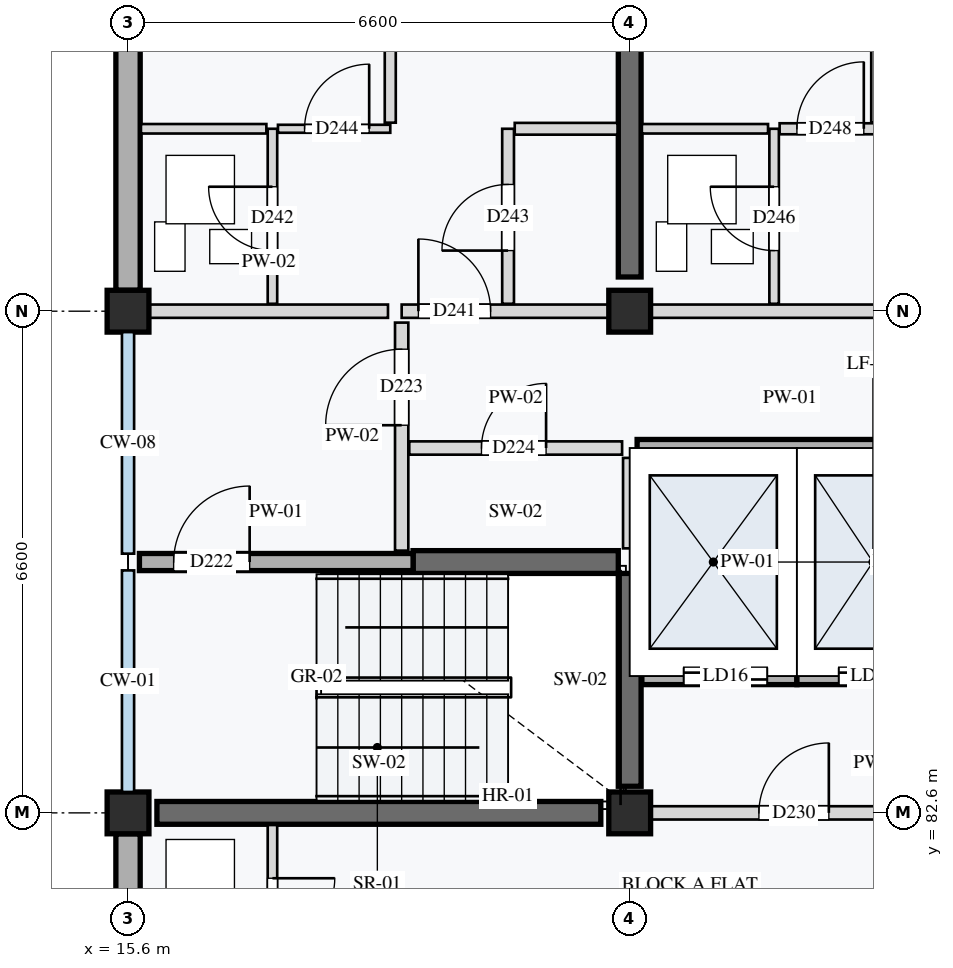
"""IFC4 building model, lengths in metres.
Left out: names, types, materials, properties, quantities, classifications, styles, units other than length and angle.
Written with IfcOpenShell. Run it as: python <this file> out.ifc"""

import sys

from ifc_helpers import new_model, si_unit, direction, frame, frame_2d, origin, origin_2d, place, context, subcontext, project, spatial, rectangle, extrude, element, fill, save


model = new_model("IFC4")
c1 = context("Model", 3, precision=1e-05, world=origin(), true_north=direction((0.0, 1.0)))
c2 = subcontext(c1, "Body", "Model", "MODEL_VIEW")
j1 = project(units=[si_unit("LENGTHUNIT", "METRE"), si_unit("PLANEANGLEUNIT", "RADIAN")], contexts=[c1])
p1 = place(None, origin())
s1 = spatial("IfcSite", under=j1, at=p1, CompositionType="ELEMENT")
p2 = place(p1, origin())
s2 = spatial("IfcBuilding", under=s1, at=p2, CompositionType="ELEMENT")
p3 = place(p2, frame((0.0, 0.0, 24.4)))
s3 = spatial("IfcBuildingStorey", under=s2, at=p3, CompositionType="ELEMENT", Elevation=24.4)
for number, where, z_axis, x_axis in (
    (1, (15.6, 82.6, 0.0), (0.0, 0.0, 1.0), (1.0, 0.0, 0.0)),
    (2, (15.6, 89.2, 0.0), (0.0, 0.0, 1.0), (1.0, 0.0, 0.0)),
    (3, (22.2, 82.6, 0.0), (0.0, 0.0, 1.0), (1.0, 0.0, 0.0)),
    (4, (22.2, 89.2, 0.0), (0.0, 0.0, 1.0), (1.0, 0.0, 0.0)),
):
    element("IfcColumn", number, at=place(p3, frame(where, z_axis=z_axis, x_axis=x_axis)), inside=s3, PredefinedType="COLUMN", context=c2, shape_type="SweptSolid", body=[
        extrude(rectangle(XDim=0.55, YDim=0.55, at=origin_2d()), origin(), (0.0, 0.0, 1.0), 3.2),
    ])
p4 = place(p3, frame((15.98, 82.6, 0.0), z_axis=(0.0, 0.0, 1.0), x_axis=(1.0, 0.0, 0.0)))
e5 = element("IfcWall", 5, at=p4, inside=s3, PredefinedType="SHEAR", context=c2, shape_type="SweptSolid", body=[
    extrude(rectangle(XDim=5.84, YDim=0.3, at=frame_2d((2.92, 0.0))), origin(), (0.0, 0.0, 1.0), 2.97),
])
p5 = place(p3, frame((19.35, 85.9, 0.0), z_axis=(0.0, 0.0, 1.0), x_axis=(1.0, 0.0, 0.0)))
e6 = element("IfcWall", 6, at=p5, inside=s3, PredefinedType="SHEAR", context=c2, shape_type="SweptSolid", body=[
    extrude(rectangle(XDim=2.7, YDim=0.3, at=frame_2d((1.35, 0.0))), origin(), (0.0, 0.0, 1.0), 2.97),
])
p6 = place(p3, frame((22.2, 82.95, 0.0), z_axis=(0.0, 0.0, 1.0), x_axis=(0.0, 1.0, 0.0)))
e7 = element("IfcWall", 7, at=p6, inside=s3, PredefinedType="SHEAR", context=c2, shape_type="SweptSolid", body=[
    extrude(rectangle(XDim=2.8, YDim=0.3, at=frame_2d((1.4, 0.0))), origin(), (0.0, 0.0, 1.0), 2.97),
])
p7 = place(p3, frame((22.2, 89.65, 0.0), z_axis=(0.0, 0.0, 1.0), x_axis=(0.0, 1.0, 0.0)))
e8 = element("IfcWall", 8, at=p7, inside=s3, PredefinedType="SHEAR", context=c2, shape_type="SweptSolid", body=[
    extrude(rectangle(XDim=5.7, YDim=0.3, at=frame_2d((2.85, 0.0))), origin(), (0.0, 0.0, 1.0), 2.97),
])
p8 = place(p3, frame((15.6, 76.275, 0.0), z_axis=(0.0, 0.0, 1.0), x_axis=(0.0, 1.0, 0.0)))
e9 = element("IfcWall", 9, at=p8, inside=s3, PredefinedType="STANDARD", context=c2, shape_type="SweptSolid", body=[
    extrude(rectangle(XDim=6.05, YDim=0.32, at=frame_2d((3.025, 0.0))), origin(), (0.0, 0.0, 1.0), 2.65),
])
p9 = place(p3, frame((15.6, 89.475, 0.0), z_axis=(0.0, 0.0, 1.0), x_axis=(0.0, 1.0, 0.0)))
e10 = element("IfcWall", 10, at=p9, inside=s3, PredefinedType="STANDARD", context=c2, shape_type="SweptSolid", body=[
    extrude(rectangle(XDim=6.05, YDim=0.32, at=frame_2d((3.025, 0.0))), origin(), (0.0, 0.0, 1.0), 2.65),
])
p10 = place(p3, frame((15.75, 85.9, 0.0), z_axis=(0.0, 0.0, 1.0), x_axis=(1.0, 0.0, 0.0)))
e11 = element("IfcWall", 11, at=p10, inside=s3, PredefinedType="STANDARD", context=c2, shape_type="SweptSolid", body=[
    extrude(rectangle(XDim=3.6, YDim=0.225, at=frame_2d((1.8, 0.0))), origin(), (0.0, 0.0, 1.0), 2.97),
])
p11 = place(p10, frame((0.45, 0.0, 0.0)))
e12 = element("IfcOpeningElement", 12, at=p11, cuts=e11, PredefinedType="OPENING", context=c2, shape_type="SweptSolid", body=[
    extrude(rectangle(XDim=1.0, YDim=2.1, at=frame_2d((0.5, 1.05))), frame((0.0, 0.123, 0.0), z_axis=(0.0, -1.0, 0.0), x_axis=(1.0, 0.0, 0.0)), (0.0, 0.0, 1.0), 0.245),
])
p12 = place(p3, frame((19.2, 86.05, 0.0), z_axis=(0.0, 0.0, 1.0), x_axis=(0.0, 1.0, 0.0)))
e13 = element("IfcWall", 13, at=p12, inside=s3, PredefinedType="PARTITIONING", context=c2, shape_type="SweptSolid", body=[
    extrude(rectangle(XDim=3.0, YDim=0.175, at=frame_2d((1.5, 0.0))), origin(), (0.0, 0.0, 1.0), 2.97),
])
p13 = place(p12, frame((1.65, 0.0, 0.0)))
e14 = element("IfcOpeningElement", 14, at=p13, cuts=e13, PredefinedType="OPENING", context=c2, shape_type="SweptSolid", body=[
    extrude(rectangle(XDim=1.0, YDim=2.16, at=frame_2d((0.5, 1.08))), frame((0.0, 0.097, 0.0), z_axis=(0.0, -1.0, 0.0), x_axis=(1.0, 0.0, 0.0)), (0.0, 0.0, 1.0), 0.195),
])
p14 = place(p3, frame((19.3, 87.4, 0.0), z_axis=(0.0, 0.0, 1.0), x_axis=(1.0, 0.0, 0.0)))
e15 = element("IfcWall", 15, at=p14, inside=s3, PredefinedType="PARTITIONING", context=c2, shape_type="SweptSolid", body=[
    extrude(rectangle(XDim=2.8, YDim=0.175, at=frame_2d((1.4, 0.0))), origin(), (0.0, 0.0, 1.0), 2.97),
])
p15 = place(p14, frame((0.95, 0.0, 0.0)))
e16 = element("IfcOpeningElement", 16, at=p15, cuts=e15, PredefinedType="OPENING", context=c2, shape_type="SweptSolid", body=[
    extrude(rectangle(XDim=0.85, YDim=2.0, at=frame_2d((0.425, 1.0))), frame((0.0, 0.097, 0.0), z_axis=(0.0, -1.0, 0.0), x_axis=(1.0, 0.0, 0.0)), (0.0, 0.0, 1.0), 0.195),
])
p16 = place(p3, frame((22.2, 86.08, 0.0), z_axis=(0.0, 0.0, 1.0), x_axis=(0.0, 1.0, 0.0)))
e17 = element("IfcWall", 17, at=p16, inside=s3, PredefinedType="PARTITIONING", context=c2, shape_type="SweptSolid", body=[
    extrude(rectangle(XDim=1.19, YDim=0.175, at=frame_2d((0.595, 0.0))), origin(), (0.0, 0.0, 1.0), 2.97),
])
p17 = place(p3, frame((22.36, 84.4, 0.0), z_axis=(0.0, 0.0, 1.0), x_axis=(1.0, 0.0, 0.0)))
e18 = element("IfcWall", 18, at=p17, inside=s3, PredefinedType="STANDARD", context=c2, shape_type="SweptSolid", body=[
    extrude(rectangle(XDim=2.04, YDim=0.225, at=frame_2d((1.02, 0.0))), origin(), (0.0, 0.0, 1.0), 2.97),
])
p18 = place(p17, frame((0.55, 0.0, 0.0)))
e19 = element("IfcOpeningElement", 19, at=p18, cuts=e18, PredefinedType="OPENING", context=c2, shape_type="SweptSolid", body=[
    extrude(rectangle(XDim=1.1, YDim=2.1, at=frame_2d((0.55, 1.05))), frame((0.0, 0.123, 0.0), z_axis=(0.0, -1.0, 0.0), x_axis=(1.0, 0.0, 0.0)), (0.0, 0.0, 1.0), 0.245),
])
p19 = place(p3, frame((24.4, 84.4, 0.0), z_axis=(0.0, 0.0, 1.0), x_axis=(1.0, 0.0, 0.0)))
e20 = element("IfcWall", 20, at=p19, inside=s3, PredefinedType="STANDARD", context=c2, shape_type="SweptSolid", body=[
    extrude(rectangle(XDim=2.0, YDim=0.225, at=frame_2d((1.0, 0.0))), origin(), (0.0, 0.0, 1.0), 2.97),
])
p20 = place(p19, frame((0.55, 0.0, 0.0)))
e21 = element("IfcOpeningElement", 21, at=p20, cuts=e20, PredefinedType="OPENING", context=c2, shape_type="SweptSolid", body=[
    extrude(rectangle(XDim=0.9, YDim=2.1, at=frame_2d((0.45, 1.05))), frame((0.0, 0.123, 0.0), z_axis=(0.0, -1.0, 0.0), x_axis=(1.0, 0.0, 0.0)), (0.0, 0.0, 1.0), 0.245),
])
p21 = place(p3, frame((22.298, 87.4, 0.0), z_axis=(0.0, 0.0, 1.0), x_axis=(1.0, 0.0, 0.0)))
e22 = element("IfcWall", 22, at=p21, inside=s3, PredefinedType="STANDARD", context=c2, shape_type="SweptSolid", body=[
    extrude(rectangle(XDim=4.022, YDim=0.225, at=frame_2d((2.011, 0.0))), origin(), (0.0, 0.0, 1.0), 2.97),
])
p22 = place(p3, frame((24.4, 84.58, 0.0), z_axis=(0.0, 0.0, 1.0), x_axis=(0.0, 1.0, 0.0)))
e23 = element("IfcWall", 23, at=p22, inside=s3, PredefinedType="STANDARD", context=c2, shape_type="SweptSolid", body=[
    extrude(rectangle(XDim=2.64, YDim=0.225, at=frame_2d((1.32, 0.0))), origin(), (0.0, 0.0, 1.0), 2.97),
])
p23 = place(p3, frame((22.2, 82.6, 0.0), z_axis=(0.0, 0.0, 1.0), x_axis=(1.0, 0.0, 0.0)))
e24 = element("IfcWall", 24, at=p23, inside=s3, PredefinedType="PARTITIONING", context=c2, shape_type="SweptSolid", body=[
    extrude(rectangle(XDim=6.6, YDim=0.175, at=frame_2d((3.3, 0.0))), origin(), (0.0, 0.0, 1.0), 2.7),
])
p24 = place(p23, frame((1.7, 0.0, 0.0)))
e25 = element("IfcOpeningElement", 25, at=p24, cuts=e24, PredefinedType="OPENING", context=c2, shape_type="SweptSolid", body=[
    extrude(rectangle(XDim=0.92, YDim=2.14, at=frame_2d((0.46, 1.07))), frame((0.0, 0.097, 0.0), z_axis=(0.0, -1.0, 0.0), x_axis=(1.0, 0.0, 0.0)), (0.0, 0.0, 1.0), 0.195),
])
p25 = place(p3, frame((17.5, 82.44, 0.0), z_axis=(0.0, 0.0, 1.0), x_axis=(0.0, -1.0, 0.0)))
e26 = element("IfcWall", 26, at=p25, inside=s3, PredefinedType="PARTITIONING", context=c2, shape_type="SweptSolid", body=[
    extrude(rectangle(XDim=2.24, YDim=0.125, at=frame_2d((1.12, 0.0))), origin(), (0.0, 0.0, 1.0), 2.97),
])
p26 = place(p25, frame((0.7, 0.0, 0.0)))
e27 = element("IfcOpeningElement", 27, at=p26, cuts=e26, PredefinedType="OPENING", context=c2, shape_type="SweptSolid", body=[
    extrude(rectangle(XDim=0.82, YDim=2.05, at=frame_2d((0.41, 1.025))), frame((0.0, 0.073, 0.0), z_axis=(0.0, -1.0, 0.0), x_axis=(1.0, 0.0, 0.0)), (0.0, 0.0, 1.0), 0.145),
])
p27 = place(p3, frame((15.88, 89.2, 0.0), z_axis=(0.0, 0.0, 1.0), x_axis=(1.0, 0.0, 0.0)))
e28 = element("IfcWall", 28, at=p27, inside=s3, PredefinedType="PARTITIONING", context=c2, shape_type="SweptSolid", body=[
    extrude(rectangle(XDim=3.14, YDim=0.175, at=frame_2d((1.57, 0.0))), origin(), (0.0, 0.0, 1.0), 2.7),
])
p28 = place(p3, frame((19.2, 89.2, 0.0), z_axis=(0.0, 0.0, 1.0), x_axis=(1.0, 0.0, 0.0)))
e29 = element("IfcWall", 29, at=p28, inside=s3, PredefinedType="PARTITIONING", context=c2, shape_type="SweptSolid", body=[
    extrude(rectangle(XDim=3.0, YDim=0.175, at=frame_2d((1.5, 0.0))), origin(), (0.0, 0.0, 1.0), 2.7),
])
p29 = place(p28, frame((0.22, 0.0, 0.0)))
e30 = element("IfcOpeningElement", 30, at=p29, cuts=e29, PredefinedType="OPENING", context=c2, shape_type="SweptSolid", body=[
    extrude(rectangle(XDim=0.95, YDim=2.16, at=frame_2d((0.475, 1.08))), frame((0.0, 0.097, 0.0), z_axis=(0.0, -1.0, 0.0), x_axis=(1.0, 0.0, 0.0)), (0.0, 0.0, 1.0), 0.195),
])
p30 = place(p3, frame((17.5, 89.298, 0.0), z_axis=(0.0, 0.0, 1.0), x_axis=(0.0, 1.0, 0.0)))
e31 = element("IfcWall", 31, at=p30, inside=s3, PredefinedType="PARTITIONING", context=c2, shape_type="SweptSolid", body=[
    extrude(rectangle(XDim=2.302, YDim=0.125, at=frame_2d((1.151, 0.0))), origin(), (0.0, 0.0, 1.0), 2.97),
])
p31 = place(p30, frame((0.7, 0.0, 0.0)))
e32 = element("IfcOpeningElement", 32, at=p31, cuts=e31, PredefinedType="OPENING", context=c2, shape_type="SweptSolid", body=[
    extrude(rectangle(XDim=0.84, YDim=2.06, at=frame_2d((0.42, 1.03))), frame((0.0, 0.073, 0.0), z_axis=(0.0, -1.0, 0.0), x_axis=(1.0, 0.0, 0.0)), (0.0, 0.0, 1.0), 0.145),
])
p32 = place(p3, frame((15.77, 91.6, 0.0), z_axis=(0.0, 0.0, 1.0), x_axis=(1.0, 0.0, 0.0)))
e33 = element("IfcWall", 33, at=p32, inside=s3, PredefinedType="PARTITIONING", context=c2, shape_type="SweptSolid", body=[
    extrude(rectangle(XDim=1.65, YDim=0.125, at=frame_2d((0.825, 0.0))), origin(), (0.0, 0.0, 1.0), 2.97),
])
p33 = place(p3, frame((20.6, 89.298, 0.0), z_axis=(0.0, 0.0, 1.0), x_axis=(0.0, 1.0, 0.0)))
e34 = element("IfcWall", 34, at=p33, inside=s3, PredefinedType="PARTITIONING", context=c2, shape_type="SweptSolid", body=[
    extrude(rectangle(XDim=2.302, YDim=0.155, at=frame_2d((1.151, 0.0))), origin(), (0.0, 0.0, 1.0), 2.97),
])
p34 = place(p33, frame((0.7, 0.0, 0.0)))
e35 = element("IfcOpeningElement", 35, at=p34, cuts=e34, PredefinedType="OPENING", context=c2, shape_type="SweptSolid", body=[
    extrude(rectangle(XDim=0.87, YDim=2.08, at=frame_2d((0.435, 1.04))), frame((0.0, 0.087, 0.0), z_axis=(0.0, -1.0, 0.0), x_axis=(1.0, 0.0, 0.0)), (0.0, 0.0, 1.0), 0.175),
])
p35 = place(p3, frame((20.688, 91.6, 0.0), z_axis=(0.0, 0.0, 1.0), x_axis=(1.0, 0.0, 0.0)))
e36 = element("IfcWall", 36, at=p35, inside=s3, PredefinedType="PARTITIONING", context=c2, shape_type="SweptSolid", body=[
    extrude(rectangle(XDim=1.353, YDim=0.155, at=frame_2d((0.676, 0.0))), origin(), (0.0, 0.0, 1.0), 2.97),
])
p36 = place(p3, frame((17.573, 91.6, 0.0), z_axis=(0.0, 0.0, 1.0), x_axis=(1.0, 0.0, 0.0)))
e37 = element("IfcWall", 37, at=p36, inside=s3, PredefinedType="PARTITIONING", context=c2, shape_type="SweptSolid", body=[
    extrude(rectangle(XDim=1.478, YDim=0.105, at=frame_2d((0.739, 0.0))), origin(), (0.0, 0.0, 1.0), 2.97),
])
p37 = place(p36, frame((0.35, 0.0, 0.0)))
e38 = element("IfcOpeningElement", 38, at=p37, cuts=e37, PredefinedType="OPENING", context=c2, shape_type="SweptSolid", body=[
    extrude(rectangle(XDim=0.85, YDim=2.1, at=frame_2d((0.425, 1.05))), frame((0.0, 0.062, 0.0), z_axis=(0.0, -1.0, 0.0), x_axis=(1.0, 0.0, 0.0)), (0.0, 0.0, 1.0), 0.125),
])
p38 = place(p3, frame((19.05, 91.68, 0.0), z_axis=(0.0, 0.0, 1.0), x_axis=(0.0, 1.0, 0.0)))
e39 = element("IfcWall", 39, at=p38, inside=s3, PredefinedType="PARTITIONING", context=c2, shape_type="SweptSolid", body=[
    extrude(rectangle(XDim=3.95, YDim=0.145, at=frame_2d((1.975, 0.0))), origin(), (0.0, 0.0, 1.0), 2.97),
])
p39 = place(p3, frame((22.2, 89.2, 0.0), z_axis=(0.0, 0.0, 1.0), x_axis=(1.0, 0.0, 0.0)))
e40 = element("IfcWall", 40, at=p39, inside=s3, PredefinedType="PARTITIONING", context=c2, shape_type="SweptSolid", body=[
    extrude(rectangle(XDim=6.6, YDim=0.175, at=frame_2d((3.3, 0.0))), origin(), (0.0, 0.0, 1.0), 2.7),
])
p40 = place(p39, frame((3.85, 0.0, 0.0)))
e41 = element("IfcOpeningElement", 41, at=p40, cuts=e40, PredefinedType="OPENING", context=c2, shape_type="SweptSolid", body=[
    extrude(rectangle(XDim=0.95, YDim=2.16, at=frame_2d((0.475, 1.08))), frame((0.0, 0.097, 0.0), z_axis=(0.0, -1.0, 0.0), x_axis=(1.0, 0.0, 0.0)), (0.0, 0.0, 1.0), 0.195),
])
p41 = place(p3, frame((24.1, 89.298, 0.0), z_axis=(0.0, 0.0, 1.0), x_axis=(0.0, 1.0, 0.0)))
e42 = element("IfcWall", 42, at=p41, inside=s3, PredefinedType="PARTITIONING", context=c2, shape_type="SweptSolid", body=[
    extrude(rectangle(XDim=2.302, YDim=0.125, at=frame_2d((1.151, 0.0))), origin(), (0.0, 0.0, 1.0), 2.97),
])
p42 = place(p41, frame((0.7, 0.0, 0.0)))
e43 = element("IfcOpeningElement", 43, at=p42, cuts=e42, PredefinedType="OPENING", context=c2, shape_type="SweptSolid", body=[
    extrude(rectangle(XDim=0.84, YDim=2.06, at=frame_2d((0.42, 1.03))), frame((0.0, 0.073, 0.0), z_axis=(0.0, -1.0, 0.0), x_axis=(1.0, 0.0, 0.0)), (0.0, 0.0, 1.0), 0.145),
])
p43 = place(p3, frame((22.36, 91.6, 0.0), z_axis=(0.0, 0.0, 1.0), x_axis=(1.0, 0.0, 0.0)))
e44 = element("IfcWall", 44, at=p43, inside=s3, PredefinedType="PARTITIONING", context=c2, shape_type="SweptSolid", body=[
    extrude(rectangle(XDim=1.66, YDim=0.125, at=frame_2d((0.83, 0.0))), origin(), (0.0, 0.0, 1.0), 2.97),
])
p44 = place(p3, frame((24.173, 91.6, 0.0), z_axis=(0.0, 0.0, 1.0), x_axis=(1.0, 0.0, 0.0)))
e45 = element("IfcWall", 45, at=p44, inside=s3, PredefinedType="PARTITIONING", context=c2, shape_type="SweptSolid", body=[
    extrude(rectangle(XDim=1.277, YDim=0.145, at=frame_2d((0.639, 0.0))), origin(), (0.0, 0.0, 1.0), 2.97),
])
p45 = place(p44, frame((0.228, 0.0, 0.0)))
e46 = element("IfcOpeningElement", 46, at=p45, cuts=e45, PredefinedType="OPENING", context=c2, shape_type="SweptSolid", body=[
    extrude(rectangle(XDim=0.88, YDim=2.1, at=frame_2d((0.44, 1.05))), frame((0.0, 0.083, 0.0), z_axis=(0.0, -1.0, 0.0), x_axis=(1.0, 0.0, 0.0)), (0.0, 0.0, 1.0), 0.165),
])
p46 = place(p3, frame((25.45, 91.683, 0.0), z_axis=(0.0, 0.0, 1.0), x_axis=(0.0, 1.0, 0.0)))
e47 = element("IfcWall", 47, at=p46, inside=s3, PredefinedType="PARTITIONING", context=c2, shape_type="SweptSolid", body=[
    extrude(rectangle(XDim=3.947, YDim=0.145, at=frame_2d((1.974, 0.0))), origin(), (0.0, 0.0, 1.0), 2.97),
])
p47 = place(p11, origin())
e48 = element("IfcDoor", 48, at=p47, inside=s3, OperationType="SINGLE_SWING_RIGHT", PredefinedType="DOOR", context=c2, shape_type="SweptSolid", body=[
    extrude(rectangle(XDim=1.0, YDim=2.1, at=frame_2d((0.5, 1.05))), frame((0.0, 0.025, 0.0), z_axis=(0.0, -1.0, 0.0), x_axis=(1.0, 0.0, 0.0)), (0.0, 0.0, 1.0), 0.05),
])
fill(e12, e48)
p48 = place(p13, origin())
e49 = element("IfcDoor", 49, at=p48, inside=s3, OperationType="SINGLE_SWING_LEFT", PredefinedType="DOOR", context=c2, shape_type="SweptSolid", body=[
    extrude(rectangle(XDim=1.0, YDim=2.16, at=frame_2d((0.5, 1.08))), frame((0.0, 0.025, 0.0), z_axis=(0.0, -1.0, 0.0), x_axis=(1.0, 0.0, 0.0)), (0.0, 0.0, 1.0), 0.05),
])
fill(e14, e49)
p49 = place(p15, origin())
e50 = element("IfcDoor", 50, at=p49, inside=s3, OperationType="SINGLE_SWING_RIGHT", PredefinedType="DOOR", context=c2, shape_type="SweptSolid", body=[
    extrude(rectangle(XDim=0.85, YDim=2.0, at=frame_2d((0.425, 1.0))), frame((0.0, 0.025, 0.0), z_axis=(0.0, -1.0, 0.0), x_axis=(1.0, 0.0, 0.0)), (0.0, 0.0, 1.0), 0.05),
])
fill(e16, e50)
p50 = place(p18, origin())
e51 = element("IfcDoor", 51, at=p50, inside=s3, OperationType="DOUBLE_DOOR_SLIDING", PredefinedType="DOOR", context=c2, shape_type="SweptSolid", body=[
    extrude(rectangle(XDim=1.1, YDim=2.1, at=frame_2d((0.55, 1.05))), frame((0.0, 0.025, 0.0), z_axis=(0.0, -1.0, 0.0), x_axis=(1.0, 0.0, 0.0)), (0.0, 0.0, 1.0), 0.05),
])
fill(e19, e51)
p51 = place(p20, origin())
e52 = element("IfcDoor", 52, at=p51, inside=s3, OperationType="DOUBLE_DOOR_SLIDING", PredefinedType="DOOR", context=c2, shape_type="SweptSolid", body=[
    extrude(rectangle(XDim=0.9, YDim=2.1, at=frame_2d((0.45, 1.05))), frame((0.0, 0.025, 0.0), z_axis=(0.0, -1.0, 0.0), x_axis=(1.0, 0.0, 0.0)), (0.0, 0.0, 1.0), 0.05),
])
fill(e21, e52)
p52 = place(p24, origin())
e53 = element("IfcDoor", 53, at=p52, inside=s3, OperationType="SINGLE_SWING_RIGHT", PredefinedType="DOOR", context=c2, shape_type="SweptSolid", body=[
    extrude(rectangle(XDim=0.92, YDim=2.14, at=frame_2d((0.46, 1.07))), frame((0.0, 0.025, 0.0), z_axis=(0.0, -1.0, 0.0), x_axis=(1.0, 0.0, 0.0)), (0.0, 0.0, 1.0), 0.05),
])
fill(e25, e53)
p53 = place(p26, origin())
e54 = element("IfcDoor", 54, at=p53, inside=s3, OperationType="SINGLE_SWING_LEFT", PredefinedType="DOOR", context=c2, shape_type="SweptSolid", body=[
    extrude(rectangle(XDim=0.82, YDim=2.05, at=frame_2d((0.41, 1.025))), frame((0.0, 0.025, 0.0), z_axis=(0.0, -1.0, 0.0), x_axis=(1.0, 0.0, 0.0)), (0.0, 0.0, 1.0), 0.05),
])
fill(e27, e54)
p54 = place(p29, origin())
e55 = element("IfcDoor", 55, at=p54, inside=s3, OperationType="SINGLE_SWING_LEFT", PredefinedType="DOOR", context=c2, shape_type="SweptSolid", body=[
    extrude(rectangle(XDim=0.95, YDim=2.16, at=frame_2d((0.475, 1.08))), frame((0.0, 0.025, 0.0), z_axis=(0.0, -1.0, 0.0), x_axis=(1.0, 0.0, 0.0)), (0.0, 0.0, 1.0), 0.05),
])
fill(e30, e55)
p55 = place(p31, origin())
e56 = element("IfcDoor", 56, at=p55, inside=s3, OperationType="SINGLE_SWING_RIGHT", PredefinedType="DOOR", context=c2, shape_type="SweptSolid", body=[
    extrude(rectangle(XDim=0.84, YDim=2.06, at=frame_2d((0.42, 1.03))), frame((0.0, 0.025, 0.0), z_axis=(0.0, -1.0, 0.0), x_axis=(1.0, 0.0, 0.0)), (0.0, 0.0, 1.0), 0.05),
])
fill(e32, e56)
p56 = place(p34, origin())
e57 = element("IfcDoor", 57, at=p56, inside=s3, OperationType="SINGLE_SWING_LEFT", PredefinedType="DOOR", context=c2, shape_type="SweptSolid", body=[
    extrude(rectangle(XDim=0.87, YDim=2.08, at=frame_2d((0.435, 1.04))), frame((0.0, 0.025, 0.0), z_axis=(0.0, -1.0, 0.0), x_axis=(1.0, 0.0, 0.0)), (0.0, 0.0, 1.0), 0.05),
])
fill(e35, e57)
p57 = place(p37, origin())
e58 = element("IfcDoor", 58, at=p57, inside=s3, OperationType="SINGLE_SWING_RIGHT", PredefinedType="DOOR", context=c2, shape_type="SweptSolid", body=[
    extrude(rectangle(XDim=0.85, YDim=2.1, at=frame_2d((0.425, 1.05))), frame((0.0, 0.025, 0.0), z_axis=(0.0, -1.0, 0.0), x_axis=(1.0, 0.0, 0.0)), (0.0, 0.0, 1.0), 0.05),
])
fill(e38, e58)
p58 = place(p42, origin())
e59 = element("IfcDoor", 59, at=p58, inside=s3, OperationType="SINGLE_SWING_RIGHT", PredefinedType="DOOR", context=c2, shape_type="SweptSolid", body=[
    extrude(rectangle(XDim=0.84, YDim=2.06, at=frame_2d((0.42, 1.03))), frame((0.0, 0.025, 0.0), z_axis=(0.0, -1.0, 0.0), x_axis=(1.0, 0.0, 0.0)), (0.0, 0.0, 1.0), 0.05),
])
fill(e43, e59)
p59 = place(p45, origin())
e60 = element("IfcDoor", 60, at=p59, inside=s3, OperationType="SINGLE_SWING_RIGHT", PredefinedType="DOOR", context=c2, shape_type="SweptSolid", body=[
    extrude(rectangle(XDim=0.88, YDim=2.1, at=frame_2d((0.44, 1.05))), frame((0.0, 0.025, 0.0), z_axis=(0.0, -1.0, 0.0), x_axis=(1.0, 0.0, 0.0)), (0.0, 0.0, 1.0), 0.05),
])
fill(e46, e60)
save(model, sys.argv[1])
